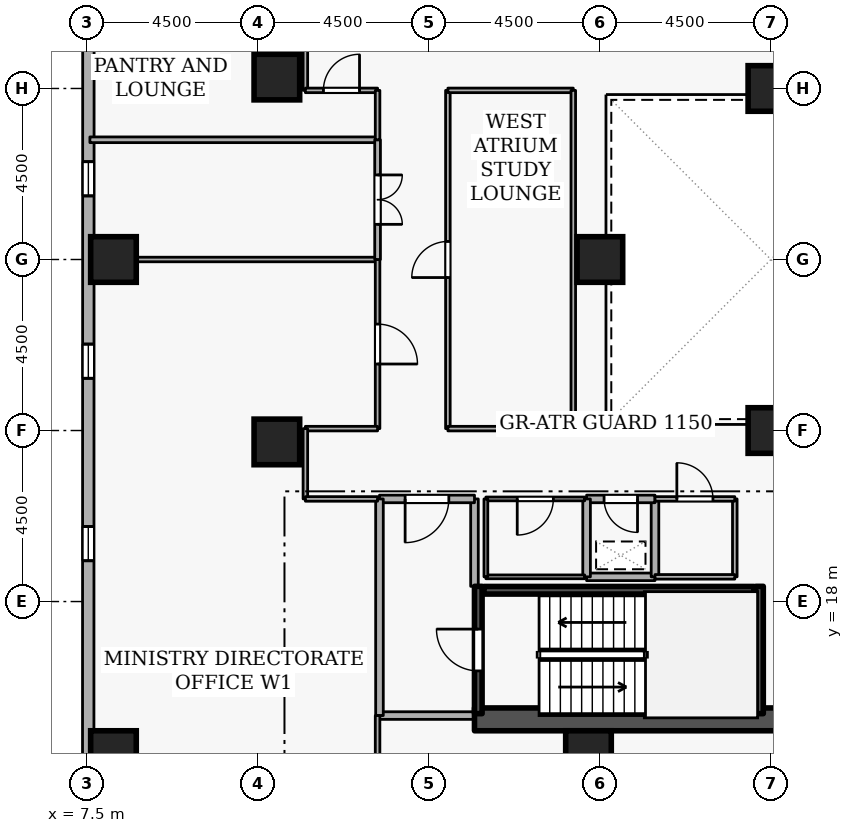
"""IFC4 building model, lengths in metres.
Left out: names, types, materials, properties, quantities, classifications, styles, units other than length and angle.
Written with IfcOpenShell. Run it as: python <this file> out.ifc"""

import sys

from ifc_helpers import new_model, si_unit, direction, frame, frame_2d, origin, origin_2d, place, context, subcontext, project, spatial, rectangle, extrude, element, fill, save


model = new_model("IFC4")
c1 = context("Model", 3, precision=1e-05, world=origin(), true_north=direction((0.0, 1.0)))
c2 = subcontext(c1, "Body", "Model", "MODEL_VIEW")
j1 = project(units=[si_unit("LENGTHUNIT", "METRE"), si_unit("PLANEANGLEUNIT", "RADIAN")], contexts=[c1])
p1 = place(None, origin())
s1 = spatial("IfcSite", under=j1, at=p1, CompositionType="ELEMENT")
p2 = place(p1, origin())
s2 = spatial("IfcBuilding", under=s1, at=p2, CompositionType="ELEMENT")
p3 = place(p2, frame((0.0, 0.0, 87.3)))
s3 = spatial("IfcBuildingStorey", under=s2, at=p3, CompositionType="ELEMENT", Elevation=87.3)
p4 = place(p3, frame((17.7, 14.9, 0.0), z_axis=(0.0, 0.0, 1.0), x_axis=(1.0, 0.0, 0.0)))
e1 = element("IfcWall", 1, at=p4, inside=s3, PredefinedType="SHEAR", context=c2, shape_type="SweptSolid", body=[
    extrude(rectangle(XDim=15.6, YDim=0.6, at=frame_2d((7.8, 0.0))), origin(), (0.0, 0.0, 1.0), 3.6),
])
for number, where, z_axis, x_axis in (
    (2, (8.2, 14.0, 0.0), (0.0, 0.0, 1.0), (1.0, 0.0, 0.0)),
    (3, (8.2, 27.0, 0.0), (0.0, 0.0, 1.0), (1.0, 0.0, 0.0)),
    (4, (12.5, 22.2, 0.0), (0.0, 0.0, 1.0), (1.0, 0.0, 0.0)),
    (5, (12.5, 31.8, 0.0), (0.0, 0.0, 1.0), (1.0, 0.0, 0.0)),
    (6, (20.7, 14.0, 0.0), (0.0, 0.0, 1.0), (1.0, 0.0, 0.0)),
    (7, (25.5, 22.5, 0.0), (0.0, 0.0, 1.0), (1.0, 0.0, 0.0)),
    (8, (25.5, 31.5, 0.0), (0.0, 0.0, 1.0), (1.0, 0.0, 0.0)),
    (9, (21.0, 27.0, 0.0), (0.0, 0.0, 1.0), (1.0, 0.0, 0.0)),
):
    element("IfcColumn", number, at=place(p3, frame(where, z_axis=z_axis, x_axis=x_axis)), inside=s3, PredefinedType="COLUMN", context=c2, shape_type="SweptSolid", body=[
        extrude(rectangle(XDim=1.2, YDim=1.2, at=origin_2d()), origin(), (0.0, 0.0, 1.0), 3.6),
    ])
p5 = place(p3, frame((7.544, 45.774, 0.0), z_axis=(0.0, 0.0, 1.0), x_axis=(-0.000243032466, -0.999999970468, 0.0)))
e10 = element("IfcWall", 10, at=p5, inside=s3, PredefinedType="STANDARD", context=c2, shape_type="SweptSolid", body=[
    extrude(rectangle(XDim=34.155, YDim=0.3, at=frame_2d((17.078, 0.0))), origin(), (0.0, 0.0, 1.0), 2.7),
])
p6 = place(p5, frame((1.8, 0.0, 0.72)))
e11 = element("IfcOpeningElement", 11, at=p6, cuts=e10, PredefinedType="OPENING", context=c2, shape_type="SweptSolid", body=[
    extrude(rectangle(XDim=0.9, YDim=1.75, at=frame_2d((0.45, 0.875))), frame((0.0, 0.16, 0.0), z_axis=(0.0, -1.0, 0.0), x_axis=(1.0, 0.0, 0.0)), (0.0, 0.0, 1.0), 0.32),
])
p7 = place(p5, frame((11.4, 0.0, 0.72)))
e12 = element("IfcOpeningElement", 12, at=p7, cuts=e10, PredefinedType="OPENING", context=c2, shape_type="SweptSolid", body=[
    extrude(rectangle(XDim=0.9, YDim=1.75, at=frame_2d((0.45, 0.875))), frame((0.0, 0.16, 0.0), z_axis=(0.0, -1.0, 0.0), x_axis=(1.0, 0.0, 0.0)), (0.0, 0.0, 1.0), 0.32),
])
p8 = place(p5, frame((16.2, 0.0, 0.72)))
e13 = element("IfcOpeningElement", 13, at=p8, cuts=e10, PredefinedType="OPENING", context=c2, shape_type="SweptSolid", body=[
    extrude(rectangle(XDim=0.9, YDim=1.75, at=frame_2d((0.45, 0.875))), frame((0.0, 0.16, 0.0), z_axis=(0.0, -1.0, 0.0), x_axis=(1.0, 0.0, 0.0)), (0.0, 0.0, 1.0), 0.32),
])
p9 = place(p5, frame((21.0, 0.0, 0.72)))
e14 = element("IfcOpeningElement", 14, at=p9, cuts=e10, PredefinedType="OPENING", context=c2, shape_type="SweptSolid", body=[
    extrude(rectangle(XDim=0.9, YDim=1.75, at=frame_2d((0.45, 0.875))), frame((0.0, 0.16, 0.0), z_axis=(0.0, -1.0, 0.0), x_axis=(1.0, 0.0, 0.0)), (0.0, 0.0, 1.0), 0.32),
])
p10 = place(p5, frame((25.8, 0.0, 0.72)))
e15 = element("IfcOpeningElement", 15, at=p10, cuts=e10, PredefinedType="OPENING", context=c2, shape_type="SweptSolid", body=[
    extrude(rectangle(XDim=0.9, YDim=1.75, at=frame_2d((0.45, 0.875))), frame((0.0, 0.16, 0.0), z_axis=(0.0, -1.0, 0.0), x_axis=(1.0, 0.0, 0.0)), (0.0, 0.0, 1.0), 0.32),
])
p11 = place(p3, frame((17.8, 15.05, 0.0), z_axis=(0.0, 0.0, 1.0), x_axis=(0.0, 1.0, 0.0)))
e16 = element("IfcWall", 16, at=p11, inside=s3, PredefinedType="SHEAR", context=c2, shape_type="SweptSolid", body=[
    extrude(rectangle(XDim=3.35, YDim=0.2, at=frame_2d((1.675, 0.0))), origin(), (0.0, 0.0, 1.0), 3.6),
])
p12 = place(p11, frame((1.125, 0.0, 0.0)))
e17 = element("IfcOpeningElement", 17, at=p12, cuts=e16, PredefinedType="OPENING", context=c2, shape_type="SweptSolid", body=[
    extrude(rectangle(XDim=1.1, YDim=2.1, at=frame_2d((0.55, 1.05))), frame((0.0, 0.11, 0.0), z_axis=(0.0, -1.0, 0.0), x_axis=(1.0, 0.0, 0.0)), (0.0, 0.0, 1.0), 0.22),
])
p13 = place(p3, frame((25.2, 18.4, 0.0), z_axis=(0.0, 0.0, 1.0), x_axis=(0.0, -1.0, 0.0)))
e18 = element("IfcWall", 18, at=p13, inside=s3, PredefinedType="SHEAR", context=c2, shape_type="SweptSolid", body=[
    extrude(rectangle(XDim=3.35, YDim=0.2, at=frame_2d((1.675, 0.0))), origin(), (0.0, 0.0, 1.0), 3.6),
])
p14 = place(p3, frame((25.05, 18.297, 0.0), z_axis=(0.0, 0.0, 1.0), x_axis=(-1.0, 0.0, 0.0)))
e19 = element("IfcWall", 19, at=p14, inside=s3, PredefinedType="SHEAR", context=c2, shape_type="SweptSolid", body=[
    extrude(rectangle(XDim=7.1, YDim=0.2, at=frame_2d((3.55, 0.0))), origin(), (0.0, 0.0, 1.0), 3.6),
])
p15 = place(p3, frame((15.2, 15.0, 0.0), z_axis=(0.0, 0.0, 1.0), x_axis=(1.0, 0.0, 0.0)))
e20 = element("IfcWall", 20, at=p15, inside=s3, PredefinedType="STANDARD", context=c2, shape_type="SweptSolid", body=[
    extrude(rectangle(XDim=2.5, YDim=0.2, at=frame_2d((1.25, 0.0))), origin(), (0.0, 0.0, 1.0), 3.34),
])
p16 = place(p3, frame((17.7, 18.4, 0.0), z_axis=(0.0, 0.0, 1.0), x_axis=(0.0, 1.0, 0.0)))
e21 = element("IfcWall", 21, at=p16, inside=s3, PredefinedType="STANDARD", context=c2, shape_type="SweptSolid", body=[
    extrude(rectangle(XDim=2.3, YDim=0.2, at=frame_2d((1.15, 0.0))), origin(), (0.0, 0.0, 1.0), 2.545),
])
p17 = place(p3, frame((17.7, 20.7, 0.0), z_axis=(0.0, 0.0, 1.0), x_axis=(-1.0, 0.0, 0.0)))
e22 = element("IfcWall", 22, at=p17, inside=s3, PredefinedType="STANDARD", context=c2, shape_type="SweptSolid", body=[
    extrude(rectangle(XDim=2.5, YDim=0.2, at=frame_2d((1.25, 0.0))), origin(), (0.0, 0.0, 1.0), 3.34),
])
p18 = place(p17, frame((0.675, 0.0, 0.0)))
e23 = element("IfcOpeningElement", 23, at=p18, cuts=e22, PredefinedType="OPENING", context=c2, shape_type="SweptSolid", body=[
    extrude(rectangle(XDim=1.15, YDim=2.1, at=frame_2d((0.575, 1.05))), frame((0.0, 0.11, 0.0), z_axis=(0.0, -1.0, 0.0), x_axis=(1.0, 0.0, 0.0)), (0.0, 0.0, 1.0), 0.22),
])
p19 = place(p3, frame((15.2, 20.7, 0.0), z_axis=(0.0, 0.0, 1.0), x_axis=(0.0, -1.0, 0.0)))
e24 = element("IfcWall", 24, at=p19, inside=s3, PredefinedType="STANDARD", context=c2, shape_type="SweptSolid", body=[
    extrude(rectangle(XDim=5.7, YDim=0.2, at=frame_2d((2.85, 0.0))), origin(), (0.0, 0.0, 1.0), 3.34),
])
p20 = place(p3, frame((20.65, 18.65, 0.0), z_axis=(0.0, 0.0, 1.0), x_axis=(1.0, 0.0, 0.0)))
e25 = element("IfcWall", 25, at=p20, inside=s3, PredefinedType="STANDARD", context=c2, shape_type="SweptSolid", body=[
    extrude(rectangle(XDim=1.8, YDim=0.2, at=frame_2d((0.9, 0.0))), origin(), (0.0, 0.0, 1.0), 3.34),
])
p21 = place(p3, frame((22.45, 18.65, 0.0), z_axis=(0.0, 0.0, 1.0), x_axis=(0.0, 1.0, 0.0)))
e26 = element("IfcWall", 26, at=p21, inside=s3, PredefinedType="STANDARD", context=c2, shape_type="SweptSolid", body=[
    extrude(rectangle(XDim=2.05, YDim=0.2, at=frame_2d((1.025, 0.0))), origin(), (0.0, 0.0, 1.0), 3.34),
])
p22 = place(p3, frame((22.45, 20.7, 0.0), z_axis=(0.0, 0.0, 1.0), x_axis=(-1.0, 0.0, 0.0)))
e27 = element("IfcWall", 27, at=p22, inside=s3, PredefinedType="STANDARD", context=c2, shape_type="SweptSolid", body=[
    extrude(rectangle(XDim=1.8, YDim=0.2, at=frame_2d((0.9, 0.0))), origin(), (0.0, 0.0, 1.0), 3.34),
])
p23 = place(p22, frame((0.46, 0.0, 0.0)))
e28 = element("IfcOpeningElement", 28, at=p23, cuts=e27, PredefinedType="OPENING", context=c2, shape_type="SweptSolid", body=[
    extrude(rectangle(XDim=0.88, YDim=2.04, at=frame_2d((0.44, 1.02))), frame((0.0, 0.11, 0.0), z_axis=(0.0, -1.0, 0.0), x_axis=(1.0, 0.0, 0.0)), (0.0, 0.0, 1.0), 0.22),
])
p24 = place(p3, frame((20.65, 20.7, 0.0), z_axis=(0.0, 0.0, 1.0), x_axis=(0.0, -1.0, 0.0)))
e29 = element("IfcWall", 29, at=p24, inside=s3, PredefinedType="STANDARD", context=c2, shape_type="SweptSolid", body=[
    extrude(rectangle(XDim=2.05, YDim=0.2, at=frame_2d((1.025, 0.0))), origin(), (0.0, 0.0, 1.0), 3.34),
])
p25 = place(p3, frame((18.0, 18.65, 0.0), z_axis=(0.0, 0.0, 1.0), x_axis=(1.0, 0.0, 0.0)))
e30 = element("IfcWall", 30, at=p25, inside=s3, PredefinedType="PARTITIONING", context=c2, shape_type="SweptSolid", body=[
    extrude(rectangle(XDim=2.6, YDim=0.1, at=frame_2d((1.3, 0.0))), origin(), (0.0, 0.0, 1.0), 3.34),
])
p26 = place(p3, frame((20.6, 20.7, 0.0), z_axis=(0.0, 0.0, 1.0), x_axis=(-1.0, 0.0, 0.0)))
e31 = element("IfcWall", 31, at=p26, inside=s3, PredefinedType="PARTITIONING", context=c2, shape_type="SweptSolid", body=[
    extrude(rectangle(XDim=2.6, YDim=0.1, at=frame_2d((1.3, 0.0))), origin(), (0.0, 0.0, 1.0), 3.34),
])
p27 = place(p26, frame((0.825, 0.0, 0.0)))
e32 = element("IfcOpeningElement", 32, at=p27, cuts=e31, PredefinedType="OPENING", context=c2, shape_type="SweptSolid", body=[
    extrude(rectangle(XDim=0.95, YDim=2.1, at=frame_2d((0.475, 1.05))), frame((0.0, 0.06, 0.0), z_axis=(0.0, -1.0, 0.0), x_axis=(1.0, 0.0, 0.0)), (0.0, 0.0, 1.0), 0.12),
])
p28 = place(p3, frame((18.0, 20.7, 0.0), z_axis=(0.0, 0.0, 1.0), x_axis=(0.0, -1.0, 0.0)))
e33 = element("IfcWall", 33, at=p28, inside=s3, PredefinedType="PARTITIONING", context=c2, shape_type="SweptSolid", body=[
    extrude(rectangle(XDim=2.05, YDim=0.1, at=frame_2d((1.025, 0.0))), origin(), (0.0, 0.0, 1.0), 2.545),
])
p29 = place(p3, frame((24.55, 20.7, 0.0), z_axis=(0.0, 0.0, 1.0), x_axis=(0.0, -1.0, 0.0)))
e34 = element("IfcWall", 34, at=p29, inside=s3, PredefinedType="PARTITIONING", context=c2, shape_type="SweptSolid", body=[
    extrude(rectangle(XDim=2.05, YDim=0.12, at=frame_2d((1.025, 0.0))), origin(), (0.0, 0.0, 1.0), 3.34),
])
p30 = place(p3, frame((24.55, 18.65, 0.0), z_axis=(0.0, 0.0, 1.0), x_axis=(-1.0, 0.0, 0.0)))
e35 = element("IfcWall", 35, at=p30, inside=s3, PredefinedType="PARTITIONING", context=c2, shape_type="SweptSolid", body=[
    extrude(rectangle(XDim=2.1, YDim=0.12, at=frame_2d((1.05, 0.0))), origin(), (0.0, 0.0, 1.0), 3.34),
])
p31 = place(p3, frame((22.45, 20.7, 0.0), z_axis=(0.0, 0.0, 1.0), x_axis=(1.0, 0.0, 0.0)))
e36 = element("IfcWall", 36, at=p31, inside=s3, PredefinedType="PARTITIONING", context=c2, shape_type="SweptSolid", body=[
    extrude(rectangle(XDim=2.1, YDim=0.12, at=frame_2d((1.05, 0.0))), origin(), (0.0, 0.0, 1.0), 3.34),
])
p32 = place(p31, frame((0.575, 0.0, 0.0)))
e37 = element("IfcOpeningElement", 37, at=p32, cuts=e36, PredefinedType="OPENING", context=c2, shape_type="SweptSolid", body=[
    extrude(rectangle(XDim=0.95, YDim=2.1, at=frame_2d((0.475, 1.05))), frame((0.0, 0.07, 0.0), z_axis=(0.0, -1.0, 0.0), x_axis=(1.0, 0.0, 0.0)), (0.0, 0.0, 1.0), 0.14),
])
p33 = place(p3, frame((7.58, 27.0, 0.0), z_axis=(0.0, 0.0, 1.0), x_axis=(1.0, 0.0, 0.0)))
e38 = element("IfcWall", 38, at=p33, inside=s3, PredefinedType="PARTITIONING", context=c2, shape_type="SweptSolid", body=[
    extrude(rectangle(XDim=7.57, YDim=0.12, at=frame_2d((3.785, 0.0))), origin(), (0.0, 0.0, 1.0), 2.932),
])
p34 = place(p3, frame((15.15, 27.0, 0.0), z_axis=(0.0, 0.0, 1.0), x_axis=(0.0, -1.0, 0.0)))
e39 = element("IfcWall", 39, at=p34, inside=s3, PredefinedType="PARTITIONING", context=c2, shape_type="SweptSolid", body=[
    extrude(rectangle(XDim=4.45, YDim=0.12, at=frame_2d((2.225, 0.0))), origin(), (0.0, 0.0, 1.0), 3.34),
])
p35 = place(p34, frame((1.7, 0.0, 0.0)))
e40 = element("IfcOpeningElement", 40, at=p35, cuts=e39, PredefinedType="OPENING", context=c2, shape_type="SweptSolid", body=[
    extrude(rectangle(XDim=1.05, YDim=2.1, at=frame_2d((0.525, 1.05))), frame((0.0, 0.07, 0.0), z_axis=(0.0, -1.0, 0.0), x_axis=(1.0, 0.0, 0.0)), (0.0, 0.0, 1.0), 0.14),
])
p36 = place(p3, frame((15.15, 22.55, 0.0), z_axis=(0.0, 0.0, 1.0), x_axis=(-1.0, 0.0, 0.0)))
e41 = element("IfcWall", 41, at=p36, inside=s3, PredefinedType="PARTITIONING", context=c2, shape_type="SweptSolid", body=[
    extrude(rectangle(XDim=1.9, YDim=0.12, at=frame_2d((0.95, 0.0))), origin(), (0.0, 0.0, 1.0), 3.34),
])
p37 = place(p3, frame((13.25, 22.55, 0.0), z_axis=(0.0, 0.0, 1.0), x_axis=(0.0, -1.0, 0.0)))
e42 = element("IfcWall", 42, at=p37, inside=s3, PredefinedType="PARTITIONING", context=c2, shape_type="SweptSolid", body=[
    extrude(rectangle(XDim=1.85, YDim=0.12, at=frame_2d((0.925, 0.0))), origin(), (0.0, 0.0, 1.0), 3.34),
])
p38 = place(p3, frame((13.25, 20.7, 0.0), z_axis=(0.0, 0.0, 1.0), x_axis=(1.0, 0.0, 0.0)))
e43 = element("IfcWall", 43, at=p38, inside=s3, PredefinedType="PARTITIONING", context=c2, shape_type="SweptSolid", body=[
    extrude(rectangle(XDim=1.9, YDim=0.12, at=frame_2d((0.95, 0.0))), origin(), (0.0, 0.0, 1.0), 3.34),
])
p39 = place(p3, frame((15.15, 15.0, 0.0), z_axis=(0.0, 0.0, 1.0), x_axis=(0.0, -1.0, 0.0)))
e44 = element("IfcWall", 44, at=p39, inside=s3, PredefinedType="PARTITIONING", context=c2, shape_type="SweptSolid", body=[
    extrude(rectangle(XDim=5.92, YDim=0.12, at=frame_2d((2.96, 0.0))), origin(), (0.0, 0.0, 1.0), 3.34),
])
p40 = place(p3, frame((7.58, 30.15, 0.0), z_axis=(0.0, 0.0, 1.0), x_axis=(1.0, 0.0, 0.0)))
e45 = element("IfcWall", 45, at=p40, inside=s3, PredefinedType="PARTITIONING", context=c2, shape_type="SweptSolid", body=[
    extrude(rectangle(XDim=7.57, YDim=0.15, at=frame_2d((3.785, 0.0))), origin(), (0.0, 0.0, 1.0), 3.34),
])
p41 = place(p3, frame((15.15, 30.15, 0.0), z_axis=(0.0, 0.0, 1.0), x_axis=(0.0, -1.0, 0.0)))
e46 = element("IfcWall", 46, at=p41, inside=s3, PredefinedType="PARTITIONING", context=c2, shape_type="SweptSolid", body=[
    extrude(rectangle(XDim=3.15, YDim=0.15, at=frame_2d((1.575, 0.0))), origin(), (0.0, 0.0, 1.0), 3.34),
])
p42 = place(p41, frame((0.925, 0.0, 0.0)))
e47 = element("IfcOpeningElement", 47, at=p42, cuts=e46, PredefinedType="OPENING", context=c2, shape_type="SweptSolid", body=[
    extrude(rectangle(XDim=1.3, YDim=2.12, at=frame_2d((0.65, 1.06))), frame((0.0, 0.085, 0.0), z_axis=(0.0, -1.0, 0.0), x_axis=(1.0, 0.0, 0.0)), (0.0, 0.0, 1.0), 0.17),
])
p43 = place(p3, frame((13.25, 33.3, 0.0), z_axis=(0.0, 0.0, 1.0), x_axis=(0.0, -1.0, 0.0)))
e48 = element("IfcWall", 48, at=p43, inside=s3, PredefinedType="PARTITIONING", context=c2, shape_type="SweptSolid", body=[
    extrude(rectangle(XDim=1.85, YDim=0.12, at=frame_2d((0.925, 0.0))), origin(), (0.0, 0.0, 1.0), 3.34),
])
p44 = place(p3, frame((13.25, 31.45, 0.0), z_axis=(0.0, 0.0, 1.0), x_axis=(1.0, 0.0, 0.0)))
e49 = element("IfcWall", 49, at=p44, inside=s3, PredefinedType="PARTITIONING", context=c2, shape_type="SweptSolid", body=[
    extrude(rectangle(XDim=1.9, YDim=0.12, at=frame_2d((0.95, 0.0))), origin(), (0.0, 0.0, 1.0), 3.34),
])
p45 = place(p44, frame((0.475, 0.0, 0.0)))
e50 = element("IfcOpeningElement", 50, at=p45, cuts=e49, PredefinedType="OPENING", context=c2, shape_type="SweptSolid", body=[
    extrude(rectangle(XDim=0.95, YDim=2.1, at=frame_2d((0.475, 1.05))), frame((0.0, 0.07, 0.0), z_axis=(0.0, -1.0, 0.0), x_axis=(1.0, 0.0, 0.0)), (0.0, 0.0, 1.0), 0.14),
])
p46 = place(p3, frame((15.15, 31.45, 0.0), z_axis=(0.0, 0.0, 1.0), x_axis=(0.0, -1.0, 0.0)))
e51 = element("IfcWall", 51, at=p46, inside=s3, PredefinedType="PARTITIONING", context=c2, shape_type="SweptSolid", body=[
    extrude(rectangle(XDim=1.3, YDim=0.12, at=frame_2d((0.65, 0.0))), origin(), (0.0, 0.0, 1.0), 3.34),
])
p47 = place(p3, frame((17.0, 22.55, 0.0), z_axis=(0.0, 0.0, 1.0), x_axis=(0.0, 1.0, 0.0)))
e52 = element("IfcWall", 52, at=p47, inside=s3, PredefinedType="PARTITIONING", context=c2, shape_type="SweptSolid", body=[
    extrude(rectangle(XDim=8.9, YDim=0.12, at=frame_2d((4.45, 0.0))), origin(), (0.0, 0.0, 1.0), 3.34),
])
p48 = place(p47, frame((3.975, 0.0, 0.0)))
e53 = element("IfcOpeningElement", 53, at=p48, cuts=e52, PredefinedType="OPENING", context=c2, shape_type="SweptSolid", body=[
    extrude(rectangle(XDim=0.95, YDim=2.1, at=frame_2d((0.475, 1.05))), frame((0.0, 0.07, 0.0), z_axis=(0.0, -1.0, 0.0), x_axis=(1.0, 0.0, 0.0)), (0.0, 0.0, 1.0), 0.14),
])
p49 = place(p3, frame((17.0, 31.45, 0.0), z_axis=(0.0, 0.0, 1.0), x_axis=(1.0, 0.0, 0.0)))
e54 = element("IfcWall", 54, at=p49, inside=s3, PredefinedType="PARTITIONING", context=c2, shape_type="SweptSolid", body=[
    extrude(rectangle(XDim=3.3, YDim=0.12, at=frame_2d((1.65, 0.0))), origin(), (0.0, 0.0, 1.0), 3.34),
])
p50 = place(p3, frame((20.3, 31.45, 0.0), z_axis=(0.0, 0.0, 1.0), x_axis=(0.0, -1.0, 0.0)))
e55 = element("IfcWall", 55, at=p50, inside=s3, PredefinedType="PARTITIONING", context=c2, shape_type="SweptSolid", body=[
    extrude(rectangle(XDim=8.9, YDim=0.12, at=frame_2d((4.45, 0.0))), origin(), (0.0, 0.0, 1.0), 3.34),
])
p51 = place(p3, frame((20.3, 22.55, 0.0), z_axis=(0.0, 0.0, 1.0), x_axis=(-1.0, 0.0, 0.0)))
e56 = element("IfcWall", 56, at=p51, inside=s3, PredefinedType="PARTITIONING", context=c2, shape_type="SweptSolid", body=[
    extrude(rectangle(XDim=3.3, YDim=0.12, at=frame_2d((1.65, 0.0))), origin(), (0.0, 0.0, 1.0), 3.34),
])
p52 = place(p8, origin())
e57 = element("IfcWindow", 57, at=p52, inside=s3, PartitioningType="SINGLE_PANEL", PredefinedType="WINDOW", context=c2, shape_type="SweptSolid", body=[
    extrude(rectangle(XDim=0.9, YDim=1.75, at=frame_2d((0.45, 0.875))), frame((0.0, 0.03, 0.0), z_axis=(0.0, -1.0, 0.0), x_axis=(1.0, 0.0, 0.0)), (0.0, 0.0, 1.0), 0.06),
])
fill(e13, e57)
p53 = place(p9, origin())
e58 = element("IfcWindow", 58, at=p53, inside=s3, PartitioningType="SINGLE_PANEL", PredefinedType="WINDOW", context=c2, shape_type="SweptSolid", body=[
    extrude(rectangle(XDim=0.9, YDim=1.75, at=frame_2d((0.45, 0.875))), frame((0.0, 0.03, 0.0), z_axis=(0.0, -1.0, 0.0), x_axis=(1.0, 0.0, 0.0)), (0.0, 0.0, 1.0), 0.06),
])
fill(e14, e58)
p54 = place(p10, origin())
e59 = element("IfcWindow", 59, at=p54, inside=s3, PartitioningType="SINGLE_PANEL", PredefinedType="WINDOW", context=c2, shape_type="SweptSolid", body=[
    extrude(rectangle(XDim=0.9, YDim=1.75, at=frame_2d((0.45, 0.875))), frame((0.0, 0.03, 0.0), z_axis=(0.0, -1.0, 0.0), x_axis=(1.0, 0.0, 0.0)), (0.0, 0.0, 1.0), 0.06),
])
fill(e15, e59)
p55 = place(p12, origin())
e60 = element("IfcDoor", 60, at=p55, inside=s3, OperationType="SINGLE_SWING_RIGHT", PredefinedType="DOOR", context=c2, shape_type="SweptSolid", body=[
    extrude(rectangle(XDim=1.1, YDim=2.1, at=frame_2d((0.55, 1.05))), frame((0.0, 0.025, 0.0), z_axis=(0.0, -1.0, 0.0), x_axis=(1.0, 0.0, 0.0)), (0.0, 0.0, 1.0), 0.05),
])
fill(e17, e60)
p56 = place(p18, origin())
e61 = element("IfcDoor", 61, at=p56, inside=s3, OperationType="SINGLE_SWING_RIGHT", PredefinedType="DOOR", context=c2, shape_type="SweptSolid", body=[
    extrude(rectangle(XDim=1.15, YDim=2.1, at=frame_2d((0.575, 1.05))), frame((0.0, 0.025, 0.0), z_axis=(0.0, -1.0, 0.0), x_axis=(1.0, 0.0, 0.0)), (0.0, 0.0, 1.0), 0.05),
])
fill(e23, e61)
p57 = place(p23, origin())
e62 = element("IfcDoor", 62, at=p57, inside=s3, OperationType="SINGLE_SWING_LEFT", PredefinedType="DOOR", context=c2, shape_type="SweptSolid", body=[
    extrude(rectangle(XDim=0.88, YDim=2.04, at=frame_2d((0.44, 1.02))), frame((0.0, 0.025, 0.0), z_axis=(0.0, -1.0, 0.0), x_axis=(1.0, 0.0, 0.0)), (0.0, 0.0, 1.0), 0.05),
])
fill(e28, e62)
p58 = place(p27, origin())
e63 = element("IfcDoor", 63, at=p58, inside=s3, OperationType="SINGLE_SWING_RIGHT", PredefinedType="DOOR", context=c2, shape_type="SweptSolid", body=[
    extrude(rectangle(XDim=0.95, YDim=2.1, at=frame_2d((0.475, 1.05))), frame((0.0, 0.025, 0.0), z_axis=(0.0, -1.0, 0.0), x_axis=(1.0, 0.0, 0.0)), (0.0, 0.0, 1.0), 0.05),
])
fill(e32, e63)
p59 = place(p32, origin())
e64 = element("IfcDoor", 64, at=p59, inside=s3, OperationType="SINGLE_SWING_LEFT", PredefinedType="DOOR", context=c2, shape_type="SweptSolid", body=[
    extrude(rectangle(XDim=0.95, YDim=2.1, at=frame_2d((0.475, 1.05))), frame((0.0, 0.025, 0.0), z_axis=(0.0, -1.0, 0.0), x_axis=(1.0, 0.0, 0.0)), (0.0, 0.0, 1.0), 0.05),
])
fill(e37, e64)
p60 = place(p35, origin())
e65 = element("IfcDoor", 65, at=p60, inside=s3, OperationType="SINGLE_SWING_RIGHT", PredefinedType="DOOR", context=c2, shape_type="SweptSolid", body=[
    extrude(rectangle(XDim=1.05, YDim=2.1, at=frame_2d((0.525, 1.05))), frame((0.0, 0.025, 0.0), z_axis=(0.0, -1.0, 0.0), x_axis=(1.0, 0.0, 0.0)), (0.0, 0.0, 1.0), 0.05),
])
fill(e40, e65)
p61 = place(p42, origin())
e66 = element("IfcDoor", 66, at=p61, inside=s3, OperationType="DOUBLE_DOOR_SINGLE_SWING", PredefinedType="DOOR", context=c2, shape_type="SweptSolid", body=[
    extrude(rectangle(XDim=1.3, YDim=2.12, at=frame_2d((0.65, 1.06))), frame((0.0, 0.025, 0.0), z_axis=(0.0, -1.0, 0.0), x_axis=(1.0, 0.0, 0.0)), (0.0, 0.0, 1.0), 0.05),
])
fill(e47, e66)
p62 = place(p45, origin())
e67 = element("IfcDoor", 67, at=p62, inside=s3, OperationType="SINGLE_SWING_RIGHT", PredefinedType="DOOR", context=c2, shape_type="SweptSolid", body=[
    extrude(rectangle(XDim=0.95, YDim=2.1, at=frame_2d((0.475, 1.05))), frame((0.0, 0.025, 0.0), z_axis=(0.0, -1.0, 0.0), x_axis=(1.0, 0.0, 0.0)), (0.0, 0.0, 1.0), 0.05),
])
fill(e50, e67)
p63 = place(p48, origin())
e68 = element("IfcDoor", 68, at=p63, inside=s3, OperationType="SINGLE_SWING_LEFT", PredefinedType="DOOR", context=c2, shape_type="SweptSolid", body=[
    extrude(rectangle(XDim=0.95, YDim=2.1, at=frame_2d((0.475, 1.05))), frame((0.0, 0.025, 0.0), z_axis=(0.0, -1.0, 0.0), x_axis=(1.0, 0.0, 0.0)), (0.0, 0.0, 1.0), 0.05),
])
fill(e53, e68)
save(model, sys.argv[1])
